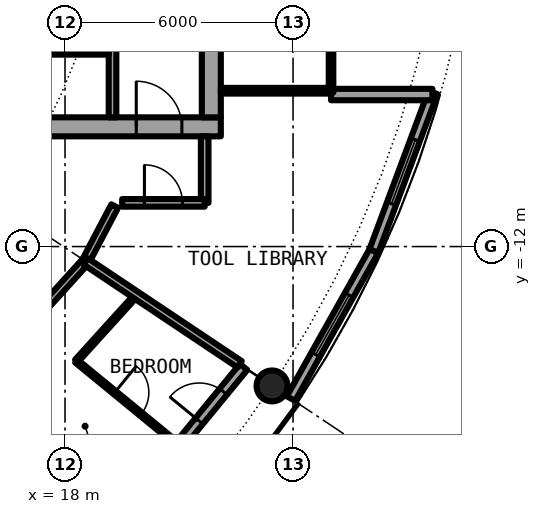
"""IFC4 building model, lengths in metres.
Left out: names, types, materials, properties, quantities, classifications, styles, units other than length and angle.
Written with IfcOpenShell. Run it as: python <this file> out.ifc"""

import sys

from ifc_helpers import new_model, si_unit, direction, frame, frame_2d, origin, origin_2d, place, context, subcontext, project, spatial, rectangle, hollow_circle, extrude, element, fill, save


model = new_model("IFC4")
c1 = context("Model", 3, precision=1e-05, world=origin(), true_north=direction((0.0, 1.0)))
c2 = subcontext(c1, "Body", "Model", "MODEL_VIEW")
j1 = project(units=[si_unit("LENGTHUNIT", "METRE"), si_unit("PLANEANGLEUNIT", "RADIAN")], contexts=[c1])
p1 = place(None, origin())
s1 = spatial("IfcSite", under=j1, at=p1, CompositionType="ELEMENT")
p2 = place(p1, origin())
s2 = spatial("IfcBuilding", under=s1, at=p2, CompositionType="ELEMENT")
p3 = place(p2, frame((0.0, 0.0, 145.2)))
s3 = spatial("IfcBuildingStorey", under=s2, at=p3, CompositionType="ELEMENT", Elevation=145.2)
p4 = place(p3, frame((23.448, -15.667, 0.0), z_axis=(0.0, 0.0, 1.0), x_axis=(1.0, 0.0, 0.0)))
e1 = element("IfcColumn", 1, at=p4, inside=s3, PredefinedType="COLUMN", context=c2, shape_type="SweptSolid", body=[
    extrude(hollow_circle(Radius=0.406, WallThickness=0.04, at=origin_2d()), origin(), (0.0, 0.0, 1.0), 3.05),
])
p5 = place(p3, frame((19.304, -19.304, 0.0), z_axis=(0.0, 0.0, 1.0), x_axis=(0.634382322723, 0.773019449054, 0.0)))
e2 = element("IfcWall", 2, at=p5, inside=s3, PredefinedType="SOLIDWALL", context=c2, shape_type="SweptSolid", body=[
    extrude(rectangle(XDim=5.352, YDim=0.25, at=frame_2d((2.676, 0.0))), origin(), (0.0, 0.0, 1.0), 2.7),
])
p6 = place(p5, frame((0.441, 0.0, 0.3)))
e3 = element("IfcOpeningElement", 3, at=p6, cuts=e2, PredefinedType="OPENING", context=c2, shape_type="SweptSolid", body=[
    extrude(rectangle(XDim=1.8, YDim=2.1, at=frame_2d((0.9, 1.05))), frame((0.0, 0.135, 0.0), z_axis=(0.0, -1.0, 0.0), x_axis=(1.0, 0.0, 0.0)), (0.0, 0.0, 1.0), 0.27),
])
p7 = place(p5, frame((3.51, 0.0, 0.0)))
e4 = element("IfcOpeningElement", 4, at=p7, cuts=e2, PredefinedType="OPENING", context=c2, shape_type="SweptSolid", body=[
    extrude(rectangle(XDim=1.0, YDim=2.2, at=frame_2d((0.5, 1.1))), frame((0.0, 0.135, 0.0), z_axis=(0.0, -1.0, 0.0), x_axis=(1.0, 0.0, 0.0)), (0.0, 0.0, 1.0), 0.27),
])
p8 = place(p3, frame((23.946, -16.0, 0.0), z_axis=(0.0, 0.0, 1.0), x_axis=(0.489696356642, 0.871893042919, 0.0)))
e5 = element("IfcWall", 5, at=p8, inside=s3, PredefinedType="SOLIDWALL", context=c2, shape_type="SweptSolid", body=[
    extrude(rectangle(XDim=4.454, YDim=0.25, at=frame_2d((2.227, 0.0))), origin(), (0.0, 0.0, 1.0), 2.7),
])
p9 = place(p8, frame((1.327, 0.0, 0.3)))
e6 = element("IfcOpeningElement", 6, at=p9, cuts=e5, PredefinedType="OPENING", context=c2, shape_type="SweptSolid", body=[
    extrude(rectangle(XDim=1.8, YDim=2.1, at=frame_2d((0.9, 1.05))), frame((0.0, 0.135, 0.0), z_axis=(0.0, -1.0, 0.0), x_axis=(1.0, 0.0, 0.0)), (0.0, 0.0, 1.0), 0.27),
])
p10 = place(p3, frame((26.127, -12.117, 0.0), z_axis=(0.0, 0.0, 1.0), x_axis=(0.349247811493, 0.937030397675, 0.0)))
e7 = element("IfcWall", 7, at=p10, inside=s3, PredefinedType="SOLIDWALL", context=c2, shape_type="SweptSolid", body=[
    extrude(rectangle(XDim=4.452, YDim=0.25, at=frame_2d((2.226, 0.0))), origin(), (0.0, 0.0, 1.0), 2.7),
])
p11 = place(p10, frame((1.327, 0.0, 0.3)))
e8 = element("IfcOpeningElement", 8, at=p11, cuts=e7, PredefinedType="OPENING", context=c2, shape_type="SweptSolid", body=[
    extrude(rectangle(XDim=1.8, YDim=2.1, at=frame_2d((0.9, 1.05))), frame((0.0, 0.135, 0.0), z_axis=(0.0, -1.0, 0.0), x_axis=(1.0, 0.0, 0.0)), (0.0, 0.0, 1.0), 0.27),
])
p12 = place(p3, frame((25.0, -8.0, 0.0), z_axis=(0.0, 0.0, 1.0), x_axis=(1.0, 0.0, 0.0)))
e9 = element("IfcWall", 9, at=p12, inside=s3, PredefinedType="SOLIDWALL", context=c2, shape_type="SweptSolid", body=[
    extrude(rectangle(XDim=2.667, YDim=0.3, at=frame_2d((1.333, 0.0))), origin(), (0.0, 0.0, 1.0), 2.7),
])
p13 = place(p3, frame((8.5, -8.85, 0.0), z_axis=(0.0, 0.0, 1.0), x_axis=(1.0, 0.0, 0.0)))
e10 = element("IfcWall", 10, at=p13, inside=s3, PredefinedType="SHEAR", context=c2, shape_type="SweptSolid", body=[
    extrude(rectangle(XDim=13.6, YDim=0.5, at=frame_2d((6.8, 0.0))), origin(), (0.0, 0.0, 1.0), 3.05),
])
p14 = place(p13, frame((11.375, 0.0, 0.0)))
e11 = element("IfcOpeningElement", 11, at=p14, cuts=e10, PredefinedType="OPENING", context=c2, shape_type="SweptSolid", body=[
    extrude(rectangle(XDim=1.2, YDim=2.3, at=frame_2d((0.6, 1.15))), frame((0.0, 0.26, 0.0), z_axis=(0.0, -1.0, 0.0), x_axis=(1.0, 0.0, 0.0)), (0.0, 0.0, 1.0), 0.52),
])
p15 = place(p3, frame((21.85, 8.6, 0.0), z_axis=(0.0, 0.0, 1.0), x_axis=(0.0, -1.0, 0.0)))
e12 = element("IfcWall", 12, at=p15, inside=s3, PredefinedType="SHEAR", context=c2, shape_type="SweptSolid", body=[
    extrude(rectangle(XDim=17.2, YDim=0.5, at=frame_2d((8.6, 0.0))), origin(), (0.0, 0.0, 1.0), 3.05),
])
p16 = place(p15, frame((7.7, 0.0, 0.0)))
e13 = element("IfcOpeningElement", 13, at=p16, cuts=e12, PredefinedType="OPENING", context=c2, shape_type="SweptSolid", body=[
    extrude(rectangle(XDim=1.8, YDim=2.3, at=frame_2d((0.9, 1.15))), frame((0.0, 0.26, 0.0), z_axis=(0.0, -1.0, 0.0), x_axis=(1.0, 0.0, 0.0)), (0.0, 0.0, 1.0), 0.52),
])
p17 = place(p3, frame((19.25, -8.6, 0.0), z_axis=(0.0, 0.0, 1.0), x_axis=(0.0, 1.0, 0.0)))
e14 = element("IfcWall", 14, at=p17, inside=s3, PredefinedType="SOLIDWALL", context=c2, shape_type="SweptSolid", body=[
    extrude(rectangle(XDim=7.025, YDim=0.2, at=frame_2d((3.513, 0.0))), origin(), (0.0, 0.0, 1.0), 2.7),
])
p18 = place(p17, frame((2.35, 0.0, 0.0)))
e15 = element("IfcOpeningElement", 15, at=p18, cuts=e14, PredefinedType="OPENING", context=c2, shape_type="SweptSolid", body=[
    extrude(rectangle(XDim=1.1, YDim=2.3, at=frame_2d((0.55, 1.15))), frame((0.0, 0.11, 0.0), z_axis=(0.0, -1.0, 0.0), x_axis=(1.0, 0.0, 0.0)), (0.0, 0.0, 1.0), 0.22),
])
p19 = place(p3, frame((15.45, -6.875, 0.0), z_axis=(0.0, 0.0, 1.0), x_axis=(1.0, 0.0, 0.0)))
e16 = element("IfcWall", 16, at=p19, inside=s3, PredefinedType="PARTITIONING", context=c2, shape_type="SweptSolid", body=[
    extrude(rectangle(XDim=3.7, YDim=0.15, at=frame_2d((1.85, 0.0))), origin(), (0.0, 0.0, 1.0), 2.7),
])
p20 = place(p19, frame((1.4, 0.0, 0.0)))
e17 = element("IfcOpeningElement", 17, at=p20, cuts=e16, PredefinedType="OPENING", context=c2, shape_type="SweptSolid", body=[
    extrude(rectangle(XDim=0.9, YDim=2.3, at=frame_2d((0.45, 1.15))), frame((0.0, 0.085, 0.0), z_axis=(0.0, -1.0, 0.0), x_axis=(1.0, 0.0, 0.0)), (0.0, 0.0, 1.0), 0.17),
])
p21 = place(p3, frame((22.1, -7.9, 0.0), z_axis=(0.0, 0.0, 1.0), x_axis=(1.0, 0.0, 0.0)))
e18 = element("IfcWall", 18, at=p21, inside=s3, PredefinedType="PARTITIONING", context=c2, shape_type="SweptSolid", body=[
    extrude(rectangle(XDim=2.84, YDim=0.15, at=frame_2d((1.42, 0.0))), origin(), (0.0, 0.0, 1.0), 2.7),
])
p22 = place(p3, frame((25.0, 7.95, 0.0), z_axis=(0.0, 0.0, 1.0), x_axis=(0.0, -1.0, 0.0)))
e19 = element("IfcWall", 19, at=p22, inside=s3, PredefinedType="PARTITIONING", context=c2, shape_type="SweptSolid", body=[
    extrude(rectangle(XDim=15.9, YDim=0.12, at=frame_2d((7.95, 0.0))), origin(), (0.0, 0.0, 1.0), 2.7),
])
p23 = place(p22, frame((6.75, 0.0, 0.0)))
e20 = element("IfcOpeningElement", 20, at=p23, cuts=e19, PredefinedType="OPENING", context=c2, shape_type="SweptSolid", body=[
    extrude(rectangle(XDim=2.4, YDim=2.3, at=frame_2d((1.2, 1.15))), frame((0.0, 0.07, 0.0), z_axis=(0.0, -1.0, 0.0), x_axis=(1.0, 0.0, 0.0)), (0.0, 0.0, 1.0), 0.14),
])
p24 = place(p22, frame((11.55, 0.0, 0.1)))
e21 = element("IfcOpeningElement", 21, at=p24, cuts=e19, PredefinedType="OPENING", context=c2, shape_type="SweptSolid", body=[
    extrude(rectangle(XDim=3.4, YDim=2.35, at=frame_2d((1.7, 1.175))), frame((0.0, 0.07, 0.0), z_axis=(0.0, -1.0, 0.0), x_axis=(1.0, 0.0, 0.0)), (0.0, 0.0, 1.0), 0.14),
])
p25 = place(p22, frame((0.95, 0.0, 0.1)))
e22 = element("IfcOpeningElement", 22, at=p25, cuts=e19, PredefinedType="OPENING", context=c2, shape_type="SweptSolid", body=[
    extrude(rectangle(XDim=3.4, YDim=2.35, at=frame_2d((1.7, 1.175))), frame((0.0, 0.07, 0.0), z_axis=(0.0, -1.0, 0.0), x_axis=(1.0, 0.0, 0.0)), (0.0, 0.0, 1.0), 0.14),
])
p26 = place(p3, frame((18.302, -15.01, 0.0), z_axis=(0.0, 0.0, 1.0), x_axis=(0.671637685376, 0.740879760544, 0.0)))
e23 = element("IfcWall", 23, at=p26, inside=s3, PredefinedType="PARTITIONING", context=c2, shape_type="SweptSolid", body=[
    extrude(rectangle(XDim=2.338, YDim=0.1, at=frame_2d((1.169, 0.0))), origin(), (0.0, 0.0, 1.0), 2.7),
])
p27 = place(p3, frame((18.542, -12.389, 0.0), z_axis=(0.0, 0.0, 1.0), x_axis=(0.465605550524, 0.884992356646, 0.0)))
e24 = element("IfcWall", 24, at=p27, inside=s3, PredefinedType="PARTITIONING", context=c2, shape_type="SweptSolid", body=[
    extrude(rectangle(XDim=1.643, YDim=0.2, at=frame_2d((0.821, 0.0))), origin(), (0.0, 0.0, 1.0), 2.7),
])
p28 = place(p3, frame((14.147, -17.238, 0.0), z_axis=(0.0, 0.0, 1.0), x_axis=(0.671561669125, 0.740948665268, 0.0)))
e25 = element("IfcWall", 25, at=p28, inside=s3, PredefinedType="PARTITIONING", context=c2, shape_type="SweptSolid", body=[
    extrude(rectangle(XDim=6.544, YDim=0.2, at=frame_2d((3.272, 0.0))), origin(), (0.0, 0.0, 1.0), 2.7),
])
p29 = place(p28, frame((3.862, 0.0, 0.0)))
e26 = element("IfcOpeningElement", 26, at=p29, cuts=e25, PredefinedType="OPENING", context=c2, shape_type="SweptSolid", body=[
    extrude(rectangle(XDim=1.0, YDim=2.3, at=frame_2d((0.5, 1.15))), frame((0.0, 0.11, 0.0), z_axis=(0.0, -1.0, 0.0), x_axis=(1.0, 0.0, 0.0)), (0.0, 0.0, 1.0), 0.22),
])
p30 = place(p3, frame((21.675, -10.85, 0.0), z_axis=(0.0, 0.0, 1.0), x_axis=(0.0, 1.0, 0.0)))
e27 = element("IfcWall", 27, at=p30, inside=s3, PredefinedType="PARTITIONING", context=c2, shape_type="SweptSolid", body=[
    extrude(rectangle(XDim=1.75, YDim=0.2, at=frame_2d((0.875, 0.0))), origin(), (0.0, 0.0, 1.0), 2.7),
])
p31 = place(p3, frame((19.504, -10.85, 0.0), z_axis=(0.0, 0.0, 1.0), x_axis=(1.0, 0.0, 0.0)))
e28 = element("IfcWall", 28, at=p31, inside=s3, PredefinedType="PARTITIONING", context=c2, shape_type="SweptSolid", body=[
    extrude(rectangle(XDim=2.171, YDim=0.2, at=frame_2d((1.085, 0.0))), origin(), (0.0, 0.0, 1.0), 2.7),
])
p32 = place(p31, frame((0.585, 0.0, 0.0)))
e29 = element("IfcOpeningElement", 29, at=p32, cuts=e28, PredefinedType="OPENING", context=c2, shape_type="SweptSolid", body=[
    extrude(rectangle(XDim=1.0, YDim=2.3, at=frame_2d((0.5, 1.15))), frame((0.0, 0.11, 0.0), z_axis=(0.0, -1.0, 0.0), x_axis=(1.0, 0.0, 0.0)), (0.0, 0.0, 1.0), 0.22),
])
p33 = place(p3, frame((18.299, -15.014, 0.0), z_axis=(0.0, 0.0, 1.0), x_axis=(0.773131168403, -0.634246163917, 0.0)))
e30 = element("IfcWall", 30, at=p33, inside=s3, PredefinedType="PARTITIONING", context=c2, shape_type="SweptSolid", body=[
    extrude(rectangle(XDim=3.505, YDim=0.1, at=frame_2d((1.752, 0.0))), origin(), (0.0, 0.0, 1.0), 2.7),
])
p34 = place(p33, frame((1.302, 0.0, 0.0)))
e31 = element("IfcOpeningElement", 31, at=p34, cuts=e30, PredefinedType="OPENING", context=c2, shape_type="SweptSolid", body=[
    extrude(rectangle(XDim=0.9, YDim=2.3, at=frame_2d((0.45, 1.15))), frame((0.0, 0.06, 0.0), z_axis=(0.0, -1.0, 0.0), x_axis=(1.0, 0.0, 0.0)), (0.0, 0.0, 1.0), 0.12),
])
p35 = place(p3, frame((18.542, -12.389, 0.0), z_axis=(0.0, 0.0, 1.0), x_axis=(0.831387096605, -0.55569370664, 0.0)))
e32 = element("IfcWall", 32, at=p35, inside=s3, PredefinedType="PARTITIONING", context=c2, shape_type="SweptSolid", body=[
    extrude(rectangle(XDim=4.875, YDim=0.2, at=frame_2d((2.438, 0.0))), origin(), (0.0, 0.0, 1.0), 2.7),
])
p36 = place(p7, origin())
e33 = element("IfcDoor", 33, at=p36, inside=s3, OperationType="SINGLE_SWING_LEFT", PredefinedType="DOOR", context=c2, shape_type="SweptSolid", body=[
    extrude(rectangle(XDim=1.0, YDim=2.2, at=frame_2d((0.5, 1.1))), frame((0.0, 0.025, 0.0), z_axis=(0.0, -1.0, 0.0), x_axis=(1.0, 0.0, 0.0)), (0.0, 0.0, 1.0), 0.05),
])
fill(e4, e33)
p37 = place(p9, origin())
e34 = element("IfcWindow", 34, at=p37, inside=s3, PartitioningType="SINGLE_PANEL", PredefinedType="WINDOW", context=c2, shape_type="SweptSolid", body=[
    extrude(rectangle(XDim=1.8, YDim=2.1, at=frame_2d((0.9, 1.05))), frame((0.0, 0.03, 0.0), z_axis=(0.0, -1.0, 0.0), x_axis=(1.0, 0.0, 0.0)), (0.0, 0.0, 1.0), 0.06),
])
fill(e6, e34)
p38 = place(p11, origin())
e35 = element("IfcWindow", 35, at=p38, inside=s3, PartitioningType="SINGLE_PANEL", PredefinedType="WINDOW", context=c2, shape_type="SweptSolid", body=[
    extrude(rectangle(XDim=1.8, YDim=2.1, at=frame_2d((0.9, 1.05))), frame((0.0, 0.03, 0.0), z_axis=(0.0, -1.0, 0.0), x_axis=(1.0, 0.0, 0.0)), (0.0, 0.0, 1.0), 0.06),
])
fill(e8, e35)
p39 = place(p20, origin())
e36 = element("IfcDoor", 36, at=p39, inside=s3, OperationType="SINGLE_SWING_LEFT", PredefinedType="DOOR", context=c2, shape_type="SweptSolid", body=[
    extrude(rectangle(XDim=0.9, YDim=2.3, at=frame_2d((0.45, 1.15))), frame((0.0, 0.025, 0.0), z_axis=(0.0, -1.0, 0.0), x_axis=(1.0, 0.0, 0.0)), (0.0, 0.0, 1.0), 0.05),
])
fill(e17, e36)
p40 = place(p14, origin())
e37 = element("IfcDoor", 37, at=p40, inside=s3, OperationType="SINGLE_SWING_LEFT", PredefinedType="DOOR", context=c2, shape_type="SweptSolid", body=[
    extrude(rectangle(XDim=1.2, YDim=2.3, at=frame_2d((0.6, 1.15))), frame((0.0, 0.025, 0.0), z_axis=(0.0, -1.0, 0.0), x_axis=(1.0, 0.0, 0.0)), (0.0, 0.0, 1.0), 0.05),
])
fill(e11, e37)
p41 = place(p24, origin())
e38 = element("IfcWindow", 38, at=p41, inside=s3, PartitioningType="SINGLE_PANEL", PredefinedType="WINDOW", context=c2, shape_type="SweptSolid", body=[
    extrude(rectangle(XDim=3.4, YDim=2.35, at=frame_2d((1.7, 1.175))), frame((0.0, 0.03, 0.0), z_axis=(0.0, -1.0, 0.0), x_axis=(1.0, 0.0, 0.0)), (0.0, 0.0, 1.0), 0.06),
])
fill(e21, e38)
p42 = place(p34, origin())
e39 = element("IfcDoor", 39, at=p42, inside=s3, OperationType="SINGLE_SWING_LEFT", PredefinedType="DOOR", context=c2, shape_type="SweptSolid", body=[
    extrude(rectangle(XDim=0.9, YDim=2.3, at=frame_2d((0.45, 1.15))), frame((0.0, 0.025, 0.0), z_axis=(0.0, -1.0, 0.0), x_axis=(1.0, 0.0, 0.0)), (0.0, 0.0, 1.0), 0.05),
])
fill(e31, e39)
p43 = place(p32, origin())
e40 = element("IfcDoor", 40, at=p43, inside=s3, OperationType="SINGLE_SWING_LEFT", PredefinedType="DOOR", context=c2, shape_type="SweptSolid", body=[
    extrude(rectangle(XDim=1.0, YDim=2.3, at=frame_2d((0.5, 1.15))), frame((0.0, 0.025, 0.0), z_axis=(0.0, -1.0, 0.0), x_axis=(1.0, 0.0, 0.0)), (0.0, 0.0, 1.0), 0.05),
])
fill(e29, e40)
save(model, sys.argv[1])
